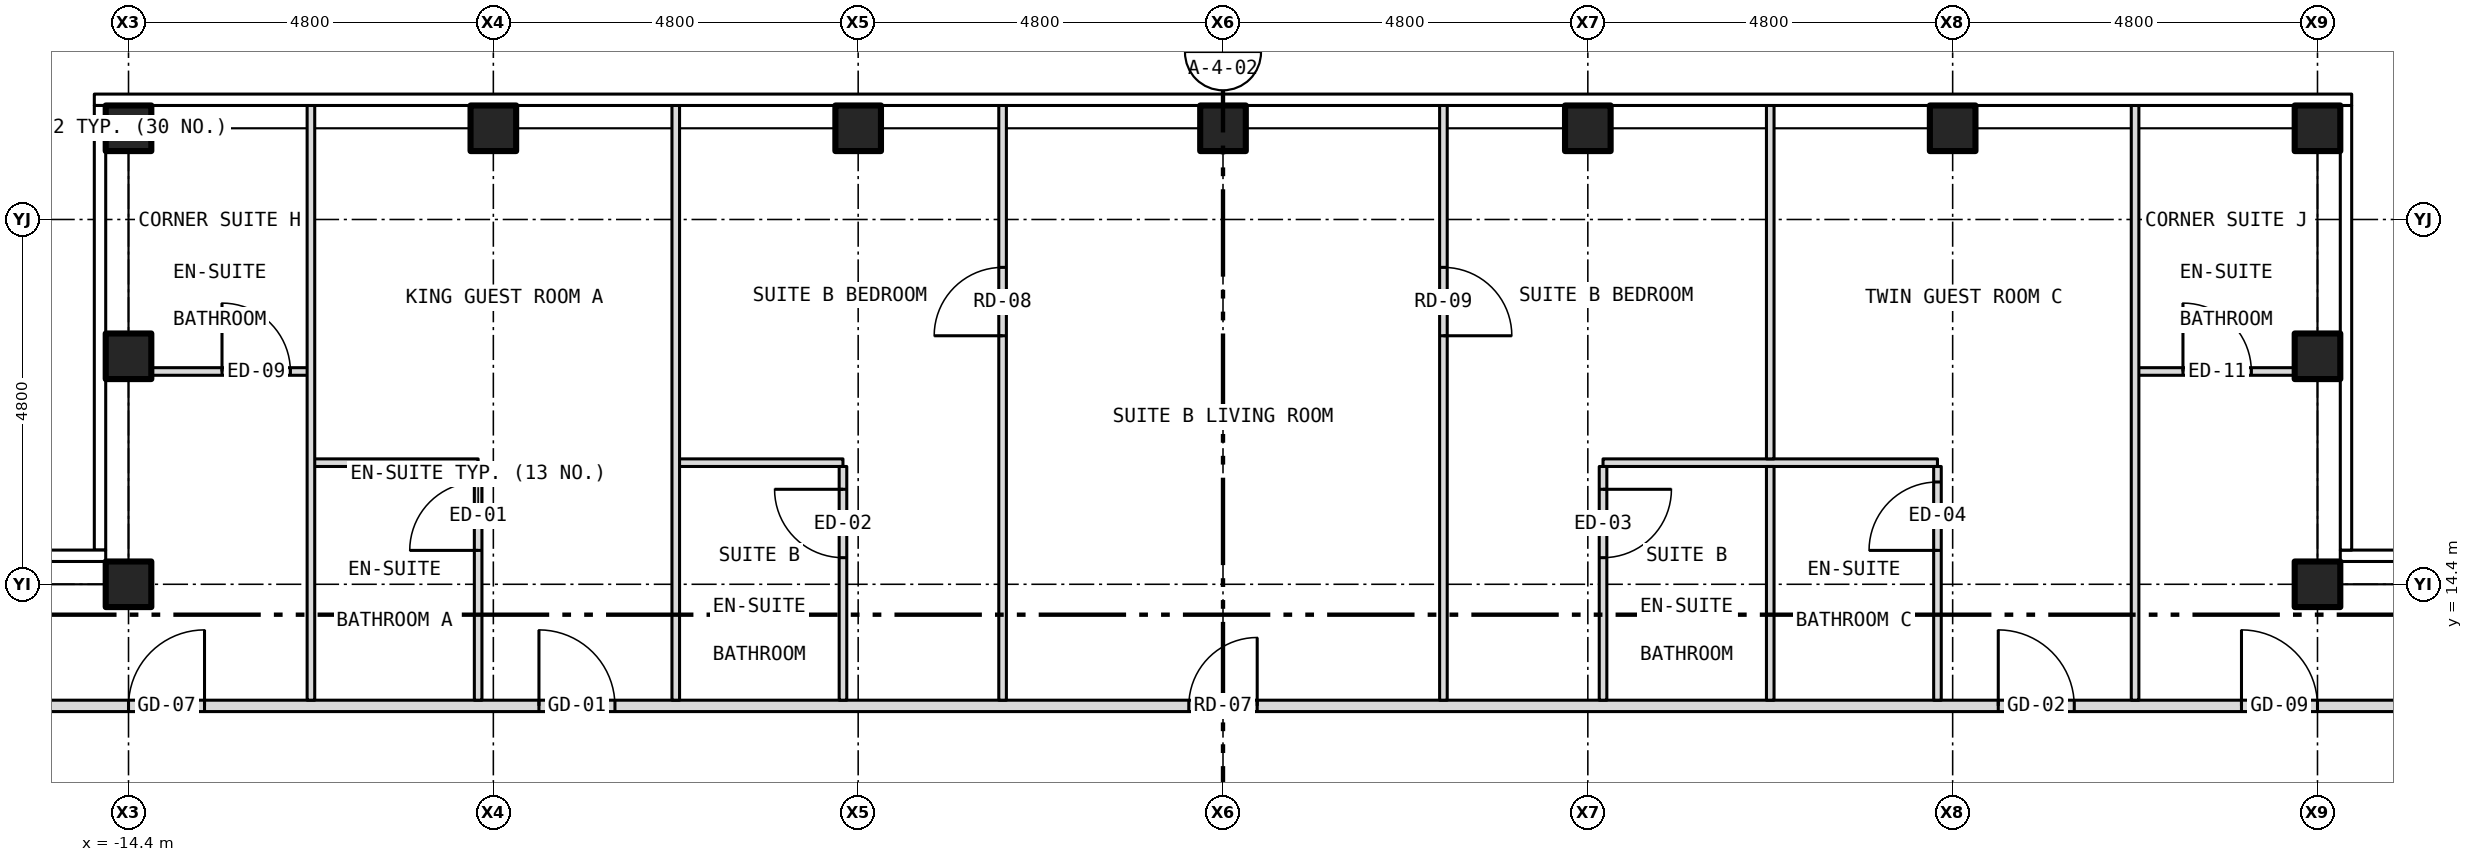
"""IFC4 building model, lengths in metres.
Left out: names, types, materials, properties, quantities, classifications, styles, units other than length and angle.
Written with IfcOpenShell. Run it as: python <this file> out.ifc"""

import sys

from ifc_helpers import new_model, si_unit, direction, frame, frame_2d, origin, origin_2d, place, context, subcontext, project, spatial, rectangle, hollow_rectangle, extrude, element, fill, save


model = new_model("IFC4")
c1 = context("Model", 3, precision=1e-05, world=origin(), true_north=direction((0.0, 1.0)))
c2 = subcontext(c1, "Body", "Model", "MODEL_VIEW")
j1 = project(units=[si_unit("LENGTHUNIT", "METRE"), si_unit("PLANEANGLEUNIT", "RADIAN")], contexts=[c1])
p1 = place(None, origin())
s1 = spatial("IfcSite", under=j1, at=p1, CompositionType="ELEMENT")
p2 = place(p1, origin())
s2 = spatial("IfcBuilding", under=s1, at=p2, CompositionType="ELEMENT")
p3 = place(p2, frame((0.0, 0.0, 244.5)))
s3 = spatial("IfcBuildingStorey", under=s2, at=p3, CompositionType="ELEMENT", Elevation=244.5)
for number, where, z_axis, x_axis in (
    (1, (-14.4, 20.4, -0.15), (0.0, 0.0, 1.0), (1.0, 0.0, 0.0)),
    (2, (-9.6, 20.4, -0.15), (0.0, 0.0, 1.0), (1.0, 0.0, 0.0)),
    (3, (-4.8, 20.4, -0.15), (0.0, 0.0, 1.0), (1.0, 0.0, 0.0)),
    (4, (0.0, 20.4, -0.15), (0.0, 0.0, 1.0), (1.0, 0.0, 0.0)),
    (5, (4.8, 20.4, -0.15), (0.0, 0.0, 1.0), (1.0, 0.0, 0.0)),
    (6, (9.6, 20.4, -0.15), (0.0, 0.0, 1.0), (1.0, 0.0, 0.0)),
    (7, (14.4, 20.4, -0.15), (0.0, 0.0, 1.0), (1.0, 0.0, 0.0)),
    (8, (-14.4, 14.4, -0.15), (0.0, 0.0, 1.0), (1.0, 0.0, 0.0)),
    (9, (-14.4, 17.4, -0.15), (0.0, 0.0, 1.0), (1.0, 0.0, 0.0)),
    (10, (14.4, 14.4, -0.15), (0.0, 0.0, 1.0), (1.0, 0.0, 0.0)),
    (11, (14.4, 17.4, -0.15), (0.0, 0.0, 1.0), (1.0, 0.0, 0.0)),
):
    element("IfcColumn", number, at=place(p3, frame(where, z_axis=z_axis, x_axis=x_axis)), inside=s3, PredefinedType="COLUMN", context=c2, shape_type="SweptSolid", body=[
        extrude(hollow_rectangle(XDim=0.6, YDim=0.6, WallThickness=0.03, at=origin_2d()), origin(), (0.0, 0.0, 1.0), 3.5),
    ])
p4 = place(p3, frame((-15.8, 12.8, 0.0), z_axis=(0.0, 0.0, 1.0), x_axis=(1.0, 0.0, 0.0)))
e12 = element("IfcWall", 12, at=p4, inside=s3, PredefinedType="PARTITIONING", context=c2, shape_type="SweptSolid", body=[
    extrude(rectangle(XDim=31.6, YDim=0.15, at=frame_2d((15.8, 0.0))), origin(), (0.0, 0.0, 1.0), 3.35),
])
p5 = place(p4, frame((6.8, 0.0, 0.0)))
e13 = element("IfcOpeningElement", 13, at=p5, cuts=e12, PredefinedType="OPENING", context=c2, shape_type="SweptSolid", body=[
    extrude(rectangle(XDim=1.0, YDim=2.1, at=frame_2d((0.5, 1.05))), frame((0.0, 0.087, 0.0), z_axis=(0.0, -1.0, 0.0), x_axis=(1.0, 0.0, 0.0)), (0.0, 0.0, 1.0), 0.174),
])
p6 = place(p4, frame((15.35, 0.0, 0.0)))
e14 = element("IfcOpeningElement", 14, at=p6, cuts=e12, PredefinedType="OPENING", context=c2, shape_type="SweptSolid", body=[
    extrude(rectangle(XDim=0.9, YDim=2.1, at=frame_2d((0.45, 1.05))), frame((0.0, 0.087, 0.0), z_axis=(0.0, -1.0, 0.0), x_axis=(1.0, 0.0, 0.0)), (0.0, 0.0, 1.0), 0.174),
])
p7 = place(p4, frame((26.0, 0.0, 0.0)))
e15 = element("IfcOpeningElement", 15, at=p7, cuts=e12, PredefinedType="OPENING", context=c2, shape_type="SweptSolid", body=[
    extrude(rectangle(XDim=1.0, YDim=2.1, at=frame_2d((0.5, 1.05))), frame((0.0, 0.087, 0.0), z_axis=(0.0, -1.0, 0.0), x_axis=(1.0, 0.0, 0.0)), (0.0, 0.0, 1.0), 0.174),
])
p8 = place(p4, frame((1.4, 0.0, 0.0)))
e16 = element("IfcOpeningElement", 16, at=p8, cuts=e12, PredefinedType="OPENING", context=c2, shape_type="SweptSolid", body=[
    extrude(rectangle(XDim=1.0, YDim=2.1, at=frame_2d((0.5, 1.05))), frame((0.0, 0.087, 0.0), z_axis=(0.0, -1.0, 0.0), x_axis=(1.0, 0.0, 0.0)), (0.0, 0.0, 1.0), 0.174),
])
p9 = place(p4, frame((29.2, 0.0, 0.0)))
e17 = element("IfcOpeningElement", 17, at=p9, cuts=e12, PredefinedType="OPENING", context=c2, shape_type="SweptSolid", body=[
    extrude(rectangle(XDim=1.0, YDim=2.1, at=frame_2d((0.5, 1.05))), frame((0.0, 0.087, 0.0), z_axis=(0.0, -1.0, 0.0), x_axis=(1.0, 0.0, 0.0)), (0.0, 0.0, 1.0), 0.174),
])
for number, where, z_axis, x_axis in (
    (18, (-12.0, 16.0, 0.0), (0.0, 0.0, 1.0), (1.0, 0.0, 0.0)),
    (19, (-7.2, 16.0, 0.0), (0.0, 0.0, 1.0), (1.0, 0.0, 0.0)),
):
    element("IfcWall", number, at=place(p3, frame(where, z_axis=z_axis, x_axis=x_axis)), inside=s3, PredefinedType="PARTITIONING", context=c2, shape_type="SweptSolid", body=[
        extrude(rectangle(XDim=2.2, YDim=0.1, at=frame_2d((1.1, 0.0))), origin(), (0.0, 0.0, 1.0), 3.35),
    ])
p10 = place(p3, frame((5.0, 16.0, 0.0), z_axis=(0.0, 0.0, 1.0), x_axis=(1.0, 0.0, 0.0)))
e20 = element("IfcWall", 20, at=p10, inside=s3, PredefinedType="PARTITIONING", context=c2, shape_type="SweptSolid", body=[
    extrude(rectangle(XDim=4.4, YDim=0.1, at=frame_2d((2.2, 0.0))), origin(), (0.0, 0.0, 1.0), 3.35),
])
p11 = place(p3, frame((-14.28, 17.2, 0.0), z_axis=(0.0, 0.0, 1.0), x_axis=(1.0, 0.0, 0.0)))
e21 = element("IfcWall", 21, at=p11, inside=s3, PredefinedType="PARTITIONING", context=c2, shape_type="SweptSolid", body=[
    extrude(rectangle(XDim=2.28, YDim=0.1, at=frame_2d((1.14, 0.0))), origin(), (0.0, 0.0, 1.0), 3.35),
])
p12 = place(p11, frame((1.11, 0.0, 0.0)))
e22 = element("IfcOpeningElement", 22, at=p12, cuts=e21, PredefinedType="OPENING", context=c2, shape_type="SweptSolid", body=[
    extrude(rectangle(XDim=0.9, YDim=2.1, at=frame_2d((0.45, 1.05))), frame((0.0, 0.062, 0.0), z_axis=(0.0, -1.0, 0.0), x_axis=(1.0, 0.0, 0.0)), (0.0, 0.0, 1.0), 0.124),
])
p13 = place(p3, frame((12.0, 17.2, 0.0), z_axis=(0.0, 0.0, 1.0), x_axis=(1.0, 0.0, 0.0)))
e23 = element("IfcWall", 23, at=p13, inside=s3, PredefinedType="PARTITIONING", context=c2, shape_type="SweptSolid", body=[
    extrude(rectangle(XDim=2.28, YDim=0.1, at=frame_2d((1.14, 0.0))), origin(), (0.0, 0.0, 1.0), 3.35),
])
p14 = place(p13, frame((0.63, 0.0, 0.0)))
e24 = element("IfcOpeningElement", 24, at=p14, cuts=e23, PredefinedType="OPENING", context=c2, shape_type="SweptSolid", body=[
    extrude(rectangle(XDim=0.9, YDim=2.1, at=frame_2d((0.45, 1.05))), frame((0.0, 0.062, 0.0), z_axis=(0.0, -1.0, 0.0), x_axis=(1.0, 0.0, 0.0)), (0.0, 0.0, 1.0), 0.124),
])
p15 = place(p3, frame((-12.0, 12.875, 0.0), z_axis=(0.0, 0.0, 1.0), x_axis=(0.0, 1.0, 0.0)))
e25 = element("IfcWall", 25, at=p15, inside=s3, PredefinedType="PARTITIONING", context=c2, shape_type="SweptSolid", body=[
    extrude(rectangle(XDim=7.855, YDim=0.1, at=frame_2d((3.927, 0.0))), origin(), (0.0, 0.0, 1.0), 3.35),
])
p16 = place(p3, frame((-9.8, 12.875, 0.0), z_axis=(0.0, 0.0, 1.0), x_axis=(0.0, 1.0, 0.0)))
e26 = element("IfcWall", 26, at=p16, inside=s3, PredefinedType="PARTITIONING", context=c2, shape_type="SweptSolid", body=[
    extrude(rectangle(XDim=3.075, YDim=0.1, at=frame_2d((1.538, 0.0))), origin(), (0.0, 0.0, 1.0), 2.728),
])
p17 = place(p16, frame((1.971, 0.0, 0.0)))
e27 = element("IfcOpeningElement", 27, at=p17, cuts=e26, PredefinedType="OPENING", context=c2, shape_type="SweptSolid", body=[
    extrude(rectangle(XDim=0.9, YDim=2.1, at=frame_2d((0.45, 1.05))), frame((0.0, 0.062, 0.0), z_axis=(0.0, -1.0, 0.0), x_axis=(1.0, 0.0, 0.0)), (0.0, 0.0, 1.0), 0.124),
])
p18 = place(p3, frame((-7.2, 12.875, 0.0), z_axis=(0.0, 0.0, 1.0), x_axis=(0.0, 1.0, 0.0)))
e28 = element("IfcWall", 28, at=p18, inside=s3, PredefinedType="PARTITIONING", context=c2, shape_type="SweptSolid", body=[
    extrude(rectangle(XDim=7.855, YDim=0.1, at=frame_2d((3.927, 0.0))), origin(), (0.0, 0.0, 1.0), 3.35),
])
p19 = place(p3, frame((-5.0, 12.875, 0.0), z_axis=(0.0, 0.0, 1.0), x_axis=(0.0, 1.0, 0.0)))
e29 = element("IfcWall", 29, at=p19, inside=s3, PredefinedType="PARTITIONING", context=c2, shape_type="SweptSolid", body=[
    extrude(rectangle(XDim=3.075, YDim=0.1, at=frame_2d((1.538, 0.0))), origin(), (0.0, 0.0, 1.0), 3.35),
])
p20 = place(p19, frame((1.875, 0.0, 0.0)))
e30 = element("IfcOpeningElement", 30, at=p20, cuts=e29, PredefinedType="OPENING", context=c2, shape_type="SweptSolid", body=[
    extrude(rectangle(XDim=0.9, YDim=2.1, at=frame_2d((0.45, 1.05))), frame((0.0, 0.062, 0.0), z_axis=(0.0, -1.0, 0.0), x_axis=(1.0, 0.0, 0.0)), (0.0, 0.0, 1.0), 0.124),
])
p21 = place(p3, frame((-2.9, 12.875, 0.0), z_axis=(0.0, 0.0, 1.0), x_axis=(0.0, 1.0, 0.0)))
e31 = element("IfcWall", 31, at=p21, inside=s3, PredefinedType="PARTITIONING", context=c2, shape_type="SweptSolid", body=[
    extrude(rectangle(XDim=7.855, YDim=0.1, at=frame_2d((3.927, 0.0))), origin(), (0.0, 0.0, 1.0), 3.35),
])
p22 = place(p21, frame((4.795, 0.0, 0.0)))
e32 = element("IfcOpeningElement", 32, at=p22, cuts=e31, PredefinedType="OPENING", context=c2, shape_type="SweptSolid", body=[
    extrude(rectangle(XDim=0.9, YDim=2.1, at=frame_2d((0.45, 1.05))), frame((0.0, 0.062, 0.0), z_axis=(0.0, -1.0, 0.0), x_axis=(1.0, 0.0, 0.0)), (0.0, 0.0, 1.0), 0.124),
])
p23 = place(p3, frame((2.9, 12.875, 0.0), z_axis=(0.0, 0.0, 1.0), x_axis=(0.0, 1.0, 0.0)))
e33 = element("IfcWall", 33, at=p23, inside=s3, PredefinedType="PARTITIONING", context=c2, shape_type="SweptSolid", body=[
    extrude(rectangle(XDim=7.855, YDim=0.1, at=frame_2d((3.927, 0.0))), origin(), (0.0, 0.0, 1.0), 3.35),
])
p24 = place(p23, frame((4.795, 0.0, 0.0)))
e34 = element("IfcOpeningElement", 34, at=p24, cuts=e33, PredefinedType="OPENING", context=c2, shape_type="SweptSolid", body=[
    extrude(rectangle(XDim=0.9, YDim=2.1, at=frame_2d((0.45, 1.05))), frame((0.0, 0.062, 0.0), z_axis=(0.0, -1.0, 0.0), x_axis=(1.0, 0.0, 0.0)), (0.0, 0.0, 1.0), 0.124),
])
p25 = place(p3, frame((5.0, 12.875, 0.0), z_axis=(0.0, 0.0, 1.0), x_axis=(0.0, 1.0, 0.0)))
e35 = element("IfcWall", 35, at=p25, inside=s3, PredefinedType="PARTITIONING", context=c2, shape_type="SweptSolid", body=[
    extrude(rectangle(XDim=3.075, YDim=0.1, at=frame_2d((1.538, 0.0))), origin(), (0.0, 0.0, 1.0), 3.35),
])
p26 = place(p25, frame((1.875, 0.0, 0.0)))
e36 = element("IfcOpeningElement", 36, at=p26, cuts=e35, PredefinedType="OPENING", context=c2, shape_type="SweptSolid", body=[
    extrude(rectangle(XDim=0.9, YDim=2.1, at=frame_2d((0.45, 1.05))), frame((0.0, 0.062, 0.0), z_axis=(0.0, -1.0, 0.0), x_axis=(1.0, 0.0, 0.0)), (0.0, 0.0, 1.0), 0.124),
])
p27 = place(p3, frame((7.2, 12.875, 0.0), z_axis=(0.0, 0.0, 1.0), x_axis=(0.0, 1.0, 0.0)))
e37 = element("IfcWall", 37, at=p27, inside=s3, PredefinedType="PARTITIONING", context=c2, shape_type="SweptSolid", body=[
    extrude(rectangle(XDim=3.075, YDim=0.1, at=frame_2d((1.538, 0.0))), origin(), (0.0, 0.0, 1.0), 3.35),
])
p28 = place(p3, frame((7.2, 16.05, 0.0), z_axis=(0.0, 0.0, 1.0), x_axis=(0.0, 1.0, 0.0)))
e38 = element("IfcWall", 38, at=p28, inside=s3, PredefinedType="PARTITIONING", context=c2, shape_type="SweptSolid", body=[
    extrude(rectangle(XDim=4.68, YDim=0.1, at=frame_2d((2.34, 0.0))), origin(), (0.0, 0.0, 1.0), 3.35),
])
p29 = place(p3, frame((9.4, 12.875, 0.0), z_axis=(0.0, 0.0, 1.0), x_axis=(0.0, 1.0, 0.0)))
e39 = element("IfcWall", 39, at=p29, inside=s3, PredefinedType="PARTITIONING", context=c2, shape_type="SweptSolid", body=[
    extrude(rectangle(XDim=3.075, YDim=0.1, at=frame_2d((1.538, 0.0))), origin(), (0.0, 0.0, 1.0), 2.728),
])
p30 = place(p29, frame((1.971, 0.0, 0.0)))
e40 = element("IfcOpeningElement", 40, at=p30, cuts=e39, PredefinedType="OPENING", context=c2, shape_type="SweptSolid", body=[
    extrude(rectangle(XDim=0.9, YDim=2.1, at=frame_2d((0.45, 1.05))), frame((0.0, 0.062, 0.0), z_axis=(0.0, -1.0, 0.0), x_axis=(1.0, 0.0, 0.0)), (0.0, 0.0, 1.0), 0.124),
])
p31 = place(p3, frame((12.0, 12.875, 0.0), z_axis=(0.0, 0.0, 1.0), x_axis=(0.0, 1.0, 0.0)))
e41 = element("IfcWall", 41, at=p31, inside=s3, PredefinedType="PARTITIONING", context=c2, shape_type="SweptSolid", body=[
    extrude(rectangle(XDim=7.855, YDim=0.1, at=frame_2d((3.927, 0.0))), origin(), (0.0, 0.0, 1.0), 3.35),
])
p32 = place(p5, origin())
e42 = element("IfcDoor", 42, at=p32, inside=s3, OperationType="SINGLE_SWING_LEFT", PredefinedType="DOOR", context=c2, shape_type="SweptSolid", body=[
    extrude(rectangle(XDim=1.0, YDim=2.1, at=frame_2d((0.5, 1.05))), frame((0.0, 0.025, 0.0), z_axis=(0.0, -1.0, 0.0), x_axis=(1.0, 0.0, 0.0)), (0.0, 0.0, 1.0), 0.05),
])
fill(e13, e42)
p33 = place(p17, origin())
e43 = element("IfcDoor", 43, at=p33, inside=s3, OperationType="SINGLE_SWING_LEFT", PredefinedType="DOOR", context=c2, shape_type="SweptSolid", body=[
    extrude(rectangle(XDim=0.9, YDim=2.1, at=frame_2d((0.45, 1.05))), frame((0.0, 0.025, 0.0), z_axis=(0.0, -1.0, 0.0), x_axis=(1.0, 0.0, 0.0)), (0.0, 0.0, 1.0), 0.05),
])
fill(e27, e43)
p34 = place(p6, origin())
e44 = element("IfcDoor", 44, at=p34, inside=s3, OperationType="SINGLE_SWING_RIGHT", PredefinedType="DOOR", context=c2, shape_type="SweptSolid", body=[
    extrude(rectangle(XDim=0.9, YDim=2.1, at=frame_2d((0.45, 1.05))), frame((0.0, 0.025, 0.0), z_axis=(0.0, -1.0, 0.0), x_axis=(1.0, 0.0, 0.0)), (0.0, 0.0, 1.0), 0.05),
])
fill(e14, e44)
p35 = place(p22, origin())
e45 = element("IfcDoor", 45, at=p35, inside=s3, OperationType="SINGLE_SWING_LEFT", PredefinedType="DOOR", context=c2, shape_type="SweptSolid", body=[
    extrude(rectangle(XDim=0.9, YDim=2.1, at=frame_2d((0.45, 1.05))), frame((0.0, 0.025, 0.0), z_axis=(0.0, -1.0, 0.0), x_axis=(1.0, 0.0, 0.0)), (0.0, 0.0, 1.0), 0.05),
])
fill(e32, e45)
p36 = place(p20, origin())
e46 = element("IfcDoor", 46, at=p36, inside=s3, OperationType="SINGLE_SWING_RIGHT", PredefinedType="DOOR", context=c2, shape_type="SweptSolid", body=[
    extrude(rectangle(XDim=0.9, YDim=2.1, at=frame_2d((0.45, 1.05))), frame((0.0, 0.025, 0.0), z_axis=(0.0, -1.0, 0.0), x_axis=(1.0, 0.0, 0.0)), (0.0, 0.0, 1.0), 0.05),
])
fill(e30, e46)
p37 = place(p24, origin())
e47 = element("IfcDoor", 47, at=p37, inside=s3, OperationType="SINGLE_SWING_LEFT", PredefinedType="DOOR", context=c2, shape_type="SweptSolid", body=[
    extrude(rectangle(XDim=0.9, YDim=2.1, at=frame_2d((0.45, 1.05))), frame((0.0, 0.025, 0.0), z_axis=(0.0, -1.0, 0.0), x_axis=(1.0, 0.0, 0.0)), (0.0, 0.0, 1.0), 0.05),
])
fill(e34, e47)
p38 = place(p26, origin())
e48 = element("IfcDoor", 48, at=p38, inside=s3, OperationType="SINGLE_SWING_RIGHT", PredefinedType="DOOR", context=c2, shape_type="SweptSolid", body=[
    extrude(rectangle(XDim=0.9, YDim=2.1, at=frame_2d((0.45, 1.05))), frame((0.0, 0.025, 0.0), z_axis=(0.0, -1.0, 0.0), x_axis=(1.0, 0.0, 0.0)), (0.0, 0.0, 1.0), 0.05),
])
fill(e36, e48)
p39 = place(p7, origin())
e49 = element("IfcDoor", 49, at=p39, inside=s3, OperationType="SINGLE_SWING_LEFT", PredefinedType="DOOR", context=c2, shape_type="SweptSolid", body=[
    extrude(rectangle(XDim=1.0, YDim=2.1, at=frame_2d((0.5, 1.05))), frame((0.0, 0.025, 0.0), z_axis=(0.0, -1.0, 0.0), x_axis=(1.0, 0.0, 0.0)), (0.0, 0.0, 1.0), 0.05),
])
fill(e15, e49)
p40 = place(p30, origin())
e50 = element("IfcDoor", 50, at=p40, inside=s3, OperationType="SINGLE_SWING_LEFT", PredefinedType="DOOR", context=c2, shape_type="SweptSolid", body=[
    extrude(rectangle(XDim=0.9, YDim=2.1, at=frame_2d((0.45, 1.05))), frame((0.0, 0.025, 0.0), z_axis=(0.0, -1.0, 0.0), x_axis=(1.0, 0.0, 0.0)), (0.0, 0.0, 1.0), 0.05),
])
fill(e40, e50)
p41 = place(p12, origin())
e51 = element("IfcDoor", 51, at=p41, inside=s3, OperationType="SINGLE_SWING_LEFT", PredefinedType="DOOR", context=c2, shape_type="SweptSolid", body=[
    extrude(rectangle(XDim=0.9, YDim=2.1, at=frame_2d((0.45, 1.05))), frame((0.0, 0.025, 0.0), z_axis=(0.0, -1.0, 0.0), x_axis=(1.0, 0.0, 0.0)), (0.0, 0.0, 1.0), 0.05),
])
fill(e22, e51)
p42 = place(p8, origin())
e52 = element("IfcDoor", 52, at=p42, inside=s3, OperationType="SINGLE_SWING_RIGHT", PredefinedType="DOOR", context=c2, shape_type="SweptSolid", body=[
    extrude(rectangle(XDim=1.0, YDim=2.1, at=frame_2d((0.5, 1.05))), frame((0.0, 0.025, 0.0), z_axis=(0.0, -1.0, 0.0), x_axis=(1.0, 0.0, 0.0)), (0.0, 0.0, 1.0), 0.05),
])
fill(e16, e52)
p43 = place(p14, origin())
e53 = element("IfcDoor", 53, at=p43, inside=s3, OperationType="SINGLE_SWING_LEFT", PredefinedType="DOOR", context=c2, shape_type="SweptSolid", body=[
    extrude(rectangle(XDim=0.9, YDim=2.1, at=frame_2d((0.45, 1.05))), frame((0.0, 0.025, 0.0), z_axis=(0.0, -1.0, 0.0), x_axis=(1.0, 0.0, 0.0)), (0.0, 0.0, 1.0), 0.05),
])
fill(e24, e53)
p44 = place(p9, origin())
e54 = element("IfcDoor", 54, at=p44, inside=s3, OperationType="SINGLE_SWING_LEFT", PredefinedType="DOOR", context=c2, shape_type="SweptSolid", body=[
    extrude(rectangle(XDim=1.0, YDim=2.1, at=frame_2d((0.5, 1.05))), frame((0.0, 0.025, 0.0), z_axis=(0.0, -1.0, 0.0), x_axis=(1.0, 0.0, 0.0)), (0.0, 0.0, 1.0), 0.05),
])
fill(e17, e54)
save(model, sys.argv[1])
